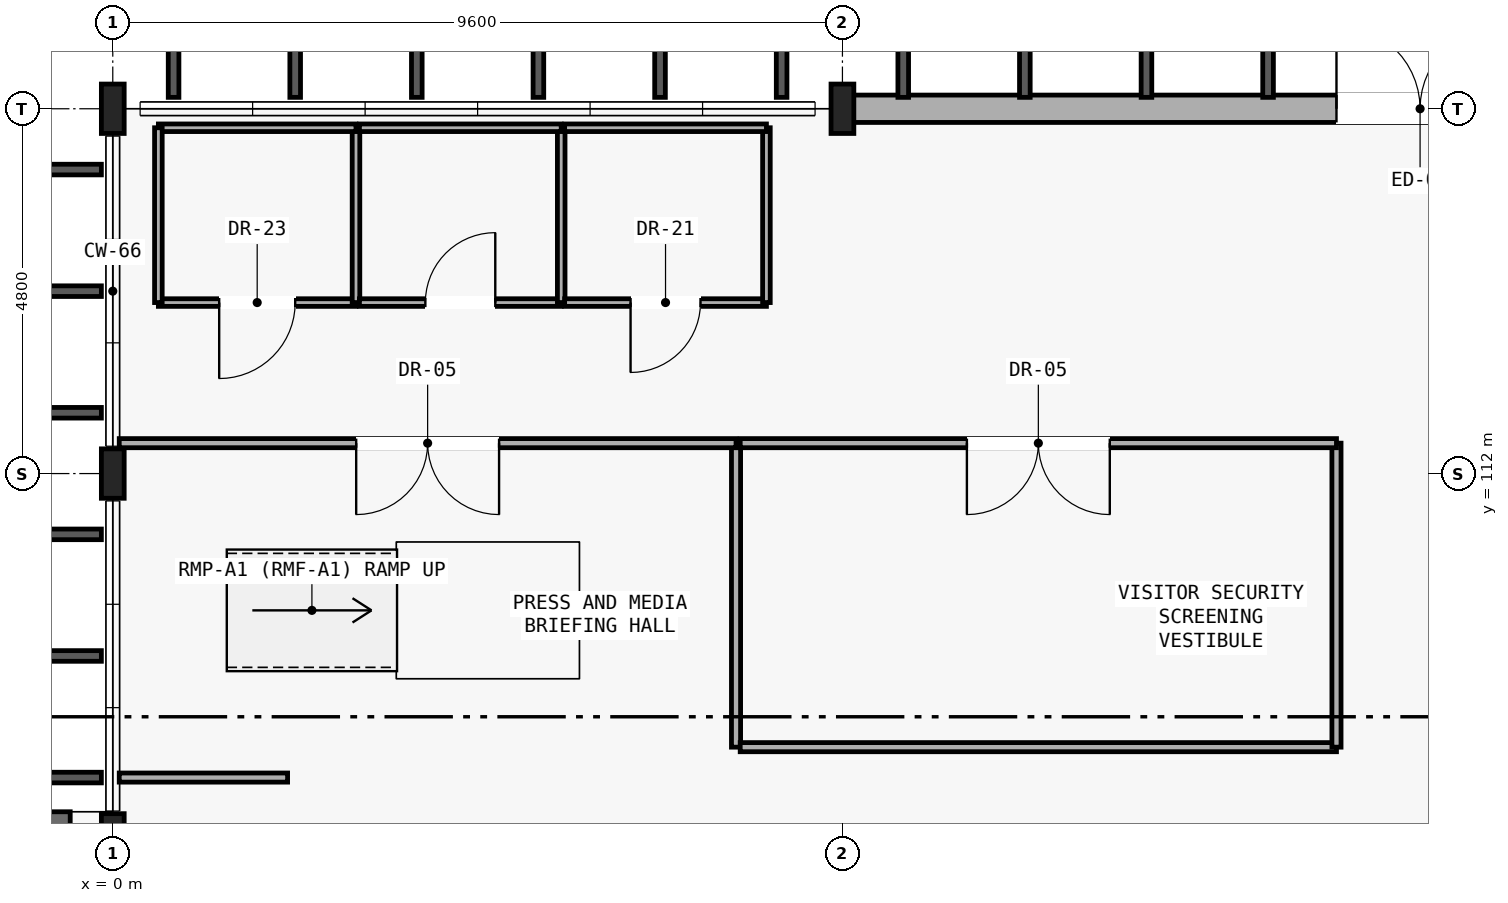
"""IFC4 building model, lengths in metres.
Left out: names, types, materials, properties, quantities, classifications, styles, units other than length and angle.
Written with IfcOpenShell. Run it as: python <this file> out.ifc"""

import sys

from ifc_helpers import new_model, si_unit, direction, frame, frame_2d, origin, origin_2d, place, context, subcontext, project, spatial, rectangle, i_section, extrude, element, fill, save


model = new_model("IFC4")
c1 = context("Model", 3, precision=1e-05, world=origin(), true_north=direction((0.0, 1.0)))
c2 = subcontext(c1, "Body", "Model", "MODEL_VIEW")
j1 = project(units=[si_unit("LENGTHUNIT", "METRE"), si_unit("PLANEANGLEUNIT", "RADIAN")], contexts=[c1])
p1 = place(None, origin())
s1 = spatial("IfcSite", under=j1, at=p1, CompositionType="ELEMENT")
p2 = place(p1, origin())
s2 = spatial("IfcBuilding", under=s1, at=p2, CompositionType="ELEMENT")
p3 = place(p2, origin())
s3 = spatial("IfcBuildingStorey", under=s2, at=p3, CompositionType="ELEMENT", Elevation=0.0)
for number, where, z_axis, x_axis in (
    (1, (0.0, 107.2, 0.0), (0.0, 0.0, 1.0), (1.0, 0.0, 0.0)),
    (2, (0.0, 112.0, 0.0), (0.0, 0.0, 1.0), (1.0, 0.0, 0.0)),
    (3, (0.0, 116.8, 0.0), (0.0, 0.0, 1.0), (1.0, 0.0, 0.0)),
    (4, (9.6, 116.8, 0.0), (0.0, 0.0, 1.0), (1.0, 0.0, 0.0)),
):
    element("IfcColumn", number, at=place(p3, frame(where, z_axis=z_axis, x_axis=x_axis)), inside=s3, PredefinedType="COLUMN", context=c2, shape_type="SweptSolid", body=[
        extrude(i_section(OverallWidth=0.3, OverallDepth=0.65, WebThickness=0.016, FlangeThickness=0.031, FilletRadius=0.027, at=origin_2d()), origin(), (0.0, 0.0, 1.0), 5.25),
    ])
p4 = place(p3, frame((-4.32, 107.35, -1.55), z_axis=(0.0, 0.0, 1.0), x_axis=(1.0, 0.0, 0.0)))
e5 = element("IfcWall", 5, at=p4, inside=s3, PredefinedType="USERDEFINED", context=c2, shape_type="SweptSolid", body=[
    extrude(rectangle(XDim=3.76, YDim=0.4, at=frame_2d((1.88, 0.0))), origin(), (0.0, 0.0, 1.0), 1.29),
])
p5 = place(p3, frame((9.61, 116.8, 0.0), z_axis=(0.0, 0.0, 1.0), x_axis=(1.0, 0.0, 0.0)))
e6 = element("IfcWall", 6, at=p5, inside=s3, PredefinedType="SOLIDWALL", context=c2, shape_type="SweptSolid", body=[
    extrude(rectangle(XDim=9.58, YDim=0.36, at=frame_2d((4.79, 0.0))), origin(), (0.0, 0.0, 1.0), 4.08),
])
p6 = place(p5, frame((6.49, 0.0, 0.0)))
e7 = element("IfcOpeningElement", 7, at=p6, cuts=e6, PredefinedType="OPENING", context=c2, shape_type="SweptSolid", body=[
    extrude(rectangle(XDim=2.2, YDim=2.35, at=frame_2d((1.1, 1.175))), frame((0.0, 0.19, 0.0), z_axis=(0.0, -1.0, 0.0), x_axis=(1.0, 0.0, 0.0)), (0.0, 0.0, 1.0), 0.38),
])
p7 = place(p3, frame((2.3, 108.0, 0.0), z_axis=(0.0, 0.0, 1.0), x_axis=(-1.0, 0.0, 0.0)))
e8 = element("IfcWall", 8, at=p7, inside=s3, PredefinedType="PARTITIONING", context=c2, shape_type="SweptSolid", body=[
    extrude(rectangle(XDim=2.215, YDim=0.12, at=frame_2d((1.107, 0.0))), origin(), (0.0, 0.0, 1.0), 5.0),
])
p8 = place(p3, frame((8.2, 108.4, 0.0), z_axis=(0.0, 0.0, 1.0), x_axis=(0.0, 1.0, 0.0)))
e9 = element("IfcWall", 9, at=p8, inside=s3, PredefinedType="PARTITIONING", context=c2, shape_type="SweptSolid", body=[
    extrude(rectangle(XDim=4.0, YDim=0.12, at=frame_2d((2.0, 0.0))), origin(), (0.0, 0.0, 1.0), 5.0),
])
p9 = place(p3, frame((8.2, 112.4, 0.0), z_axis=(0.0, 0.0, 1.0), x_axis=(-1.0, 0.0, 0.0)))
e10 = element("IfcWall", 10, at=p9, inside=s3, PredefinedType="PARTITIONING", context=c2, shape_type="SweptSolid", body=[
    extrude(rectangle(XDim=8.115, YDim=0.12, at=frame_2d((4.058, 0.0))), origin(), (0.0, 0.0, 1.0), 5.0),
])
p10 = place(p9, frame((3.117, 0.0, 0.0)))
e11 = element("IfcOpeningElement", 11, at=p10, cuts=e10, PredefinedType="OPENING", context=c2, shape_type="SweptSolid", body=[
    extrude(rectangle(XDim=1.88, YDim=2.25, at=frame_2d((0.94, 1.125))), frame((0.0, 0.07, 0.0), z_axis=(0.0, -1.0, 0.0), x_axis=(1.0, 0.0, 0.0)), (0.0, 0.0, 1.0), 0.14),
])
p11 = place(p3, frame((0.6, 114.25, 0.0), z_axis=(0.0, 0.0, 1.0), x_axis=(1.0, 0.0, 0.0)))
e12 = element("IfcWall", 12, at=p11, inside=s3, PredefinedType="PARTITIONING", context=c2, shape_type="SweptSolid", body=[
    extrude(rectangle(XDim=2.6, YDim=0.1, at=frame_2d((1.3, 0.0))), origin(), (0.0, 0.0, 1.0), 4.48),
])
p12 = place(p11, frame((0.8, 0.0, 0.0)))
e13 = element("IfcOpeningElement", 13, at=p12, cuts=e12, PredefinedType="OPENING", context=c2, shape_type="SweptSolid", body=[
    extrude(rectangle(XDim=1.0, YDim=2.08, at=frame_2d((0.5, 1.04))), frame((0.0, 0.06, 0.0), z_axis=(0.0, -1.0, 0.0), x_axis=(1.0, 0.0, 0.0)), (0.0, 0.0, 1.0), 0.12),
])
p13 = place(p3, frame((3.2, 114.25, 0.0), z_axis=(0.0, 0.0, 1.0), x_axis=(0.0, 1.0, 0.0)))
e14 = element("IfcWall", 14, at=p13, inside=s3, PredefinedType="PARTITIONING", context=c2, shape_type="SweptSolid", body=[
    extrude(rectangle(XDim=2.3, YDim=0.1, at=frame_2d((1.15, 0.0))), origin(), (0.0, 0.0, 1.0), 5.0),
])
p14 = place(p3, frame((3.2, 116.55, 0.0), z_axis=(0.0, 0.0, 1.0), x_axis=(-1.0, 0.0, 0.0)))
e15 = element("IfcWall", 15, at=p14, inside=s3, PredefinedType="PARTITIONING", context=c2, shape_type="SweptSolid", body=[
    extrude(rectangle(XDim=2.6, YDim=0.1, at=frame_2d((1.3, 0.0))), origin(), (0.0, 0.0, 1.0), 4.08),
])
p15 = place(p3, frame((0.6, 116.55, 0.0), z_axis=(0.0, 0.0, 1.0), x_axis=(0.0, -1.0, 0.0)))
e16 = element("IfcWall", 16, at=p15, inside=s3, PredefinedType="PARTITIONING", context=c2, shape_type="SweptSolid", body=[
    extrude(rectangle(XDim=2.3, YDim=0.1, at=frame_2d((1.15, 0.0))), origin(), (0.0, 0.0, 1.0), 5.0),
])
p16 = place(p3, frame((3.245, 114.25, 0.0), z_axis=(0.0, 0.0, 1.0), x_axis=(1.0, 0.0, 0.0)))
e17 = element("IfcWall", 17, at=p16, inside=s3, PredefinedType="PARTITIONING", context=c2, shape_type="SweptSolid", body=[
    extrude(rectangle(XDim=2.655, YDim=0.1, at=frame_2d((1.327, 0.0))), origin(), (0.0, 0.0, 1.0), 4.48),
])
p17 = place(p16, frame((0.867, 0.0, 0.0)))
e18 = element("IfcOpeningElement", 18, at=p17, cuts=e17, PredefinedType="OPENING", context=c2, shape_type="SweptSolid", body=[
    extrude(rectangle(XDim=0.92, YDim=2.08, at=frame_2d((0.46, 1.04))), frame((0.0, 0.06, 0.0), z_axis=(0.0, -1.0, 0.0), x_axis=(1.0, 0.0, 0.0)), (0.0, 0.0, 1.0), 0.12),
])
p18 = place(p3, frame((5.9, 114.25, 0.0), z_axis=(0.0, 0.0, 1.0), x_axis=(0.0, 1.0, 0.0)))
e19 = element("IfcWall", 19, at=p18, inside=s3, PredefinedType="PARTITIONING", context=c2, shape_type="SweptSolid", body=[
    extrude(rectangle(XDim=2.3, YDim=0.1, at=frame_2d((1.15, 0.0))), origin(), (0.0, 0.0, 1.0), 5.0),
])
p19 = place(p3, frame((5.9, 116.55, 0.0), z_axis=(0.0, 0.0, 1.0), x_axis=(-1.0, 0.0, 0.0)))
e20 = element("IfcWall", 20, at=p19, inside=s3, PredefinedType="PARTITIONING", context=c2, shape_type="SweptSolid", body=[
    extrude(rectangle(XDim=2.655, YDim=0.1, at=frame_2d((1.327, 0.0))), origin(), (0.0, 0.0, 1.0), 4.08),
])
p20 = place(p3, frame((5.945, 114.25, 0.0), z_axis=(0.0, 0.0, 1.0), x_axis=(1.0, 0.0, 0.0)))
e21 = element("IfcWall", 21, at=p20, inside=s3, PredefinedType="PARTITIONING", context=c2, shape_type="SweptSolid", body=[
    extrude(rectangle(XDim=2.655, YDim=0.1, at=frame_2d((1.328, 0.0))), origin(), (0.0, 0.0, 1.0), 4.48),
])
p21 = place(p20, frame((0.867, 0.0, 0.0)))
e22 = element("IfcOpeningElement", 22, at=p21, cuts=e21, PredefinedType="OPENING", context=c2, shape_type="SweptSolid", body=[
    extrude(rectangle(XDim=0.92, YDim=2.08, at=frame_2d((0.46, 1.04))), frame((0.0, 0.06, 0.0), z_axis=(0.0, -1.0, 0.0), x_axis=(1.0, 0.0, 0.0)), (0.0, 0.0, 1.0), 0.12),
])
p22 = place(p3, frame((8.6, 114.25, 0.0), z_axis=(0.0, 0.0, 1.0), x_axis=(0.0, 1.0, 0.0)))
e23 = element("IfcWall", 23, at=p22, inside=s3, PredefinedType="PARTITIONING", context=c2, shape_type="SweptSolid", body=[
    extrude(rectangle(XDim=2.3, YDim=0.1, at=frame_2d((1.15, 0.0))), origin(), (0.0, 0.0, 1.0), 5.0),
])
p23 = place(p3, frame((8.6, 116.55, 0.0), z_axis=(0.0, 0.0, 1.0), x_axis=(-1.0, 0.0, 0.0)))
e24 = element("IfcWall", 24, at=p23, inside=s3, PredefinedType="PARTITIONING", context=c2, shape_type="SweptSolid", body=[
    extrude(rectangle(XDim=2.655, YDim=0.1, at=frame_2d((1.328, 0.0))), origin(), (0.0, 0.0, 1.0), 4.08),
])
p24 = place(p3, frame((8.255, 108.4, 0.0), z_axis=(0.0, 0.0, 1.0), x_axis=(1.0, 0.0, 0.0)))
e25 = element("IfcWall", 25, at=p24, inside=s3, PredefinedType="PARTITIONING", context=c2, shape_type="SweptSolid", body=[
    extrude(rectangle(XDim=7.845, YDim=0.12, at=frame_2d((3.923, 0.0))), origin(), (0.0, 0.0, 1.0), 5.0),
])
p25 = place(p3, frame((16.1, 108.4, 0.0), z_axis=(0.0, 0.0, 1.0), x_axis=(0.0, 1.0, 0.0)))
e26 = element("IfcWall", 26, at=p25, inside=s3, PredefinedType="PARTITIONING", context=c2, shape_type="SweptSolid", body=[
    extrude(rectangle(XDim=4.0, YDim=0.12, at=frame_2d((2.0, 0.0))), origin(), (0.0, 0.0, 1.0), 5.0),
])
p26 = place(p3, frame((16.1, 112.4, 0.0), z_axis=(0.0, 0.0, 1.0), x_axis=(-1.0, 0.0, 0.0)))
e27 = element("IfcWall", 27, at=p26, inside=s3, PredefinedType="PARTITIONING", context=c2, shape_type="SweptSolid", body=[
    extrude(rectangle(XDim=7.845, YDim=0.12, at=frame_2d((3.923, 0.0))), origin(), (0.0, 0.0, 1.0), 5.0),
])
p27 = place(p26, frame((2.982, 0.0, 0.0)))
e28 = element("IfcOpeningElement", 28, at=p27, cuts=e27, PredefinedType="OPENING", context=c2, shape_type="SweptSolid", body=[
    extrude(rectangle(XDim=1.88, YDim=2.25, at=frame_2d((0.94, 1.125))), frame((0.0, 0.07, 0.0), z_axis=(0.0, -1.0, 0.0), x_axis=(1.0, 0.0, 0.0)), (0.0, 0.0, 1.0), 0.14),
])
p28 = place(p6, origin())
e29 = element("IfcDoor", 29, at=p28, inside=s3, OperationType="SINGLE_SWING_LEFT", PredefinedType="DOOR", context=c2, shape_type="SweptSolid", body=[
    extrude(rectangle(XDim=2.2, YDim=2.35, at=frame_2d((1.1, 1.175))), frame((0.0, 0.025, 0.0), z_axis=(0.0, -1.0, 0.0), x_axis=(1.0, 0.0, 0.0)), (0.0, 0.0, 1.0), 0.05),
])
fill(e7, e29)
p29 = place(p10, origin())
e30 = element("IfcDoor", 30, at=p29, inside=s3, OperationType="DOUBLE_DOOR_SINGLE_SWING", PredefinedType="DOOR", context=c2, shape_type="SweptSolid", body=[
    extrude(rectangle(XDim=1.88, YDim=2.25, at=frame_2d((0.94, 1.125))), frame((0.0, 0.025, 0.0), z_axis=(0.0, -1.0, 0.0), x_axis=(1.0, 0.0, 0.0)), (0.0, 0.0, 1.0), 0.05),
])
fill(e11, e30)
p30 = place(p12, frame((1.0, 0.0, 0.0), z_axis=(0.0, 0.0, 1.0), x_axis=(-1.0, 0.0, 0.0)))
e31 = element("IfcDoor", 31, at=p30, inside=s3, OperationType="SINGLE_SWING_LEFT", PredefinedType="DOOR", context=c2, shape_type="SweptSolid", body=[
    extrude(rectangle(XDim=1.0, YDim=2.08, at=frame_2d((0.5, 1.04))), frame((0.0, 0.025, 0.0), z_axis=(0.0, -1.0, 0.0), x_axis=(1.0, 0.0, 0.0)), (0.0, 0.0, 1.0), 0.05),
])
fill(e13, e31)
p31 = place(p17, origin())
e32 = element("IfcDoor", 32, at=p31, inside=s3, OperationType="SINGLE_SWING_RIGHT", PredefinedType="DOOR", context=c2, shape_type="SweptSolid", body=[
    extrude(rectangle(XDim=0.92, YDim=2.08, at=frame_2d((0.46, 1.04))), frame((0.0, 0.025, 0.0), z_axis=(0.0, -1.0, 0.0), x_axis=(1.0, 0.0, 0.0)), (0.0, 0.0, 1.0), 0.05),
])
fill(e18, e32)
p32 = place(p21, frame((0.92, 0.0, 0.0), z_axis=(0.0, 0.0, 1.0), x_axis=(-1.0, 0.0, 0.0)))
e33 = element("IfcDoor", 33, at=p32, inside=s3, OperationType="SINGLE_SWING_LEFT", PredefinedType="DOOR", context=c2, shape_type="SweptSolid", body=[
    extrude(rectangle(XDim=0.92, YDim=2.08, at=frame_2d((0.46, 1.04))), frame((0.0, 0.025, 0.0), z_axis=(0.0, -1.0, 0.0), x_axis=(1.0, 0.0, 0.0)), (0.0, 0.0, 1.0), 0.05),
])
fill(e22, e33)
p33 = place(p27, origin())
e34 = element("IfcDoor", 34, at=p33, inside=s3, OperationType="DOUBLE_DOOR_SINGLE_SWING", PredefinedType="DOOR", context=c2, shape_type="SweptSolid", body=[
    extrude(rectangle(XDim=1.88, YDim=2.25, at=frame_2d((0.94, 1.125))), frame((0.0, 0.025, 0.0), z_axis=(0.0, -1.0, 0.0), x_axis=(1.0, 0.0, 0.0)), (0.0, 0.0, 1.0), 0.05),
])
fill(e28, e34)
save(model, sys.argv[1])
